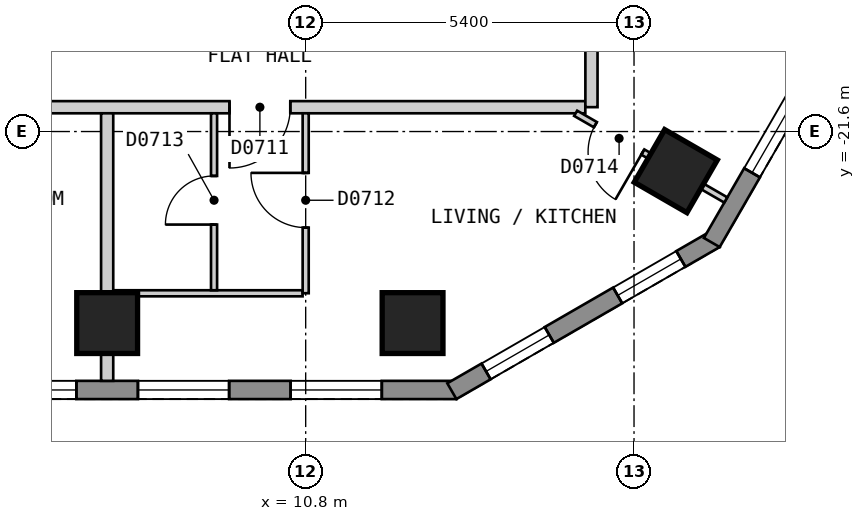
"""IFC4 building model, lengths in metres.
Left out: names, types, materials, properties, quantities, classifications, styles, units other than length and angle.
Written with IfcOpenShell. Run it as: python <this file> out.ifc"""

import sys

from ifc_helpers import new_model, si_unit, direction, frame, frame_2d, origin, origin_2d, place, context, subcontext, project, spatial, polyline, rectangle, outline, extrude, element, fill, save


model = new_model("IFC4")
c1 = context("Model", 3, precision=1e-05, world=origin(), true_north=direction((0.0, 1.0)))
c2 = subcontext(c1, "Body", "Model", "MODEL_VIEW")
j1 = project(units=[si_unit("LENGTHUNIT", "METRE"), si_unit("PLANEANGLEUNIT", "RADIAN")], contexts=[c1])
p1 = place(None, origin())
s1 = spatial("IfcSite", under=j1, at=p1, CompositionType="ELEMENT")
p2 = place(p1, origin())
s2 = spatial("IfcBuilding", under=s1, at=p2, CompositionType="ELEMENT")
p3 = place(p2, frame((0.0, 0.0, 105.0)))
s3 = spatial("IfcBuildingStorey", under=s2, at=p3, CompositionType="ELEMENT", Elevation=105.0)
for number, where, z_axis, x_axis in (
    (1, (7.535, -24.75, 0.0), (0.0, 0.0, 1.0), (1.0, 0.0, 0.0)),
    (2, (12.558, -24.75, 0.0), (0.0, 0.0, 1.0), (1.0, 0.0, 0.0)),
    (3, (16.887, -22.251, 0.0), (0.0, 0.0, 1.0), (0.5, 0.866, 0.0)),
):
    element("IfcColumn", number, at=place(p3, frame(where, z_axis=z_axis, x_axis=x_axis)), inside=s3, PredefinedType="COLUMN", context=c2, shape_type="SweptSolid", body=[
        extrude(rectangle(XDim=1.0, YDim=1.0, at=origin_2d()), origin(), (0.0, 0.0, 1.0), 3.0),
    ])
p4 = place(p3, frame((-13.279, -25.85, 0.0), z_axis=(0.0, 0.0, 1.0), x_axis=(1.0, 0.0, 0.0)))
e4 = element("IfcWall", 4, at=p4, inside=s3, PredefinedType="SOLIDWALL", context=c2, shape_type="SweptSolid", body=[
    extrude(outline(polyline([(0.0, -0.15), (26.558, -0.15), (26.478, 0.15), (0.08, 0.15), (0.0, -0.15)])), origin(), (0.0, 0.0, 1.0), 2.6),
])
p5 = place(p4, frame((1.228, 0.0, 0.15)))
e5 = element("IfcOpeningElement", 5, at=p5, cuts=e4, PredefinedType="OPENING", context=c2, shape_type="SweptSolid", body=[
    extrude(rectangle(XDim=1.5, YDim=2.1, at=frame_2d((0.75, 1.05))), frame((0.0, 0.16, 0.0), z_axis=(0.0, -1.0, 0.0), x_axis=(1.0, 0.0, 0.0)), (0.0, 0.0, 1.0), 0.32),
])
p6 = place(p4, frame((3.739, 0.0, 0.15)))
e6 = element("IfcOpeningElement", 6, at=p6, cuts=e4, PredefinedType="OPENING", context=c2, shape_type="SweptSolid", body=[
    extrude(rectangle(XDim=1.5, YDim=2.1, at=frame_2d((0.75, 1.05))), frame((0.0, 0.16, 0.0), z_axis=(0.0, -1.0, 0.0), x_axis=(1.0, 0.0, 0.0)), (0.0, 0.0, 1.0), 0.32),
])
p7 = place(p4, frame((6.251, 0.0, 0.15)))
e7 = element("IfcOpeningElement", 7, at=p7, cuts=e4, PredefinedType="OPENING", context=c2, shape_type="SweptSolid", body=[
    extrude(rectangle(XDim=1.5, YDim=2.1, at=frame_2d((0.75, 1.05))), frame((0.0, 0.16, 0.0), z_axis=(0.0, -1.0, 0.0), x_axis=(1.0, 0.0, 0.0)), (0.0, 0.0, 1.0), 0.32),
])
p8 = place(p4, frame((8.762, 0.0, 0.15)))
e8 = element("IfcOpeningElement", 8, at=p8, cuts=e4, PredefinedType="OPENING", context=c2, shape_type="SweptSolid", body=[
    extrude(rectangle(XDim=1.5, YDim=2.1, at=frame_2d((0.75, 1.05))), frame((0.0, 0.16, 0.0), z_axis=(0.0, -1.0, 0.0), x_axis=(1.0, 0.0, 0.0)), (0.0, 0.0, 1.0), 0.32),
])
p9 = place(p4, frame((11.274, 0.0, 0.15)))
e9 = element("IfcOpeningElement", 9, at=p9, cuts=e4, PredefinedType="OPENING", context=c2, shape_type="SweptSolid", body=[
    extrude(rectangle(XDim=1.5, YDim=2.1, at=frame_2d((0.75, 1.05))), frame((0.0, 0.16, 0.0), z_axis=(0.0, -1.0, 0.0), x_axis=(1.0, 0.0, 0.0)), (0.0, 0.0, 1.0), 0.32),
])
p10 = place(p4, frame((13.785, 0.0, 0.15)))
e10 = element("IfcOpeningElement", 10, at=p10, cuts=e4, PredefinedType="OPENING", context=c2, shape_type="SweptSolid", body=[
    extrude(rectangle(XDim=1.5, YDim=2.1, at=frame_2d((0.75, 1.05))), frame((0.0, 0.16, 0.0), z_axis=(0.0, -1.0, 0.0), x_axis=(1.0, 0.0, 0.0)), (0.0, 0.0, 1.0), 0.32),
])
p11 = place(p4, frame((16.297, 0.0, 0.15)))
e11 = element("IfcOpeningElement", 11, at=p11, cuts=e4, PredefinedType="OPENING", context=c2, shape_type="SweptSolid", body=[
    extrude(rectangle(XDim=1.5, YDim=2.1, at=frame_2d((0.75, 1.05))), frame((0.0, 0.16, 0.0), z_axis=(0.0, -1.0, 0.0), x_axis=(1.0, 0.0, 0.0)), (0.0, 0.0, 1.0), 0.32),
])
p12 = place(p4, frame((18.808, 0.0, 0.15)))
e12 = element("IfcOpeningElement", 12, at=p12, cuts=e4, PredefinedType="OPENING", context=c2, shape_type="SweptSolid", body=[
    extrude(rectangle(XDim=1.5, YDim=2.1, at=frame_2d((0.75, 1.05))), frame((0.0, 0.16, 0.0), z_axis=(0.0, -1.0, 0.0), x_axis=(1.0, 0.0, 0.0)), (0.0, 0.0, 1.0), 0.32),
])
p13 = place(p4, frame((21.32, 0.0, 0.15)))
e13 = element("IfcOpeningElement", 13, at=p13, cuts=e4, PredefinedType="OPENING", context=c2, shape_type="SweptSolid", body=[
    extrude(rectangle(XDim=1.5, YDim=2.1, at=frame_2d((0.75, 1.05))), frame((0.0, 0.16, 0.0), z_axis=(0.0, -1.0, 0.0), x_axis=(1.0, 0.0, 0.0)), (0.0, 0.0, 1.0), 0.32),
])
p14 = place(p4, frame((23.831, 0.0, 0.15)))
e14 = element("IfcOpeningElement", 14, at=p14, cuts=e4, PredefinedType="OPENING", context=c2, shape_type="SweptSolid", body=[
    extrude(rectangle(XDim=1.5, YDim=2.1, at=frame_2d((0.75, 1.05))), frame((0.0, 0.16, 0.0), z_axis=(0.0, -1.0, 0.0), x_axis=(1.0, 0.0, 0.0)), (0.0, 0.0, 1.0), 0.32),
])
p15 = place(p3, frame((13.204, -25.87, 0.0), z_axis=(0.0, 0.0, 1.0), x_axis=(0.866010750942, 0.50002537861, 0.0)))
e15 = element("IfcWall", 15, at=p15, inside=s3, PredefinedType="SOLIDWALL", context=c2, shape_type="SweptSolid", body=[
    extrude(outline(polyline([(0.0, -0.15), (5.0, -0.15), (4.919, 0.15), (0.08, 0.15), (0.0, -0.15)])), origin(), (0.0, 0.0, 1.0), 2.6),
])
p16 = place(p15, frame((0.65, 0.0, 0.15)))
e16 = element("IfcOpeningElement", 16, at=p16, cuts=e15, PredefinedType="OPENING", context=c2, shape_type="SweptSolid", body=[
    extrude(rectangle(XDim=1.2, YDim=2.1, at=frame_2d((0.6, 1.05))), frame((0.0, 0.16, 0.0), z_axis=(0.0, -1.0, 0.0), x_axis=(1.0, 0.0, 0.0)), (0.0, 0.0, 1.0), 0.32),
])
p17 = place(p15, frame((3.149, 0.0, 0.15)))
e17 = element("IfcOpeningElement", 17, at=p17, cuts=e15, PredefinedType="OPENING", context=c2, shape_type="SweptSolid", body=[
    extrude(rectangle(XDim=1.2, YDim=2.1, at=frame_2d((0.6, 1.05))), frame((0.0, 0.16, 0.0), z_axis=(0.0, -1.0, 0.0), x_axis=(1.0, 0.0, 0.0)), (0.0, 0.0, 1.0), 0.32),
])
p18 = place(p3, frame((17.479, -23.425, 0.0), z_axis=(0.0, 0.0, 1.0), x_axis=(0.500035407905, 0.866004960056, 0.0)))
e18 = element("IfcWall", 18, at=p18, inside=s3, PredefinedType="SOLIDWALL", context=c2, shape_type="SweptSolid", body=[
    extrude(outline(polyline([(0.0, -0.15), (23.094, -0.15), (23.014, 0.15), (0.08, 0.15), (0.0, -0.15)])), origin(), (0.0, 0.0, 1.0), 2.6),
])
p19 = place(p18, frame((1.324, 0.0, 0.15)))
e19 = element("IfcOpeningElement", 19, at=p19, cuts=e18, PredefinedType="OPENING", context=c2, shape_type="SweptSolid", body=[
    extrude(rectangle(XDim=1.5, YDim=2.1, at=frame_2d((0.75, 1.05))), frame((0.0, 0.16, 0.0), z_axis=(0.0, -1.0, 0.0), x_axis=(1.0, 0.0, 0.0)), (0.0, 0.0, 1.0), 0.32),
])
p20 = place(p18, frame((4.031, 0.0, 0.15)))
e20 = element("IfcOpeningElement", 20, at=p20, cuts=e18, PredefinedType="OPENING", context=c2, shape_type="SweptSolid", body=[
    extrude(rectangle(XDim=1.5, YDim=2.1, at=frame_2d((0.75, 1.05))), frame((0.0, 0.16, 0.0), z_axis=(0.0, -1.0, 0.0), x_axis=(1.0, 0.0, 0.0)), (0.0, 0.0, 1.0), 0.32),
])
p21 = place(p18, frame((6.737, 0.0, 0.15)))
e21 = element("IfcOpeningElement", 21, at=p21, cuts=e18, PredefinedType="OPENING", context=c2, shape_type="SweptSolid", body=[
    extrude(rectangle(XDim=1.5, YDim=2.1, at=frame_2d((0.75, 1.05))), frame((0.0, 0.16, 0.0), z_axis=(0.0, -1.0, 0.0), x_axis=(1.0, 0.0, 0.0)), (0.0, 0.0, 1.0), 0.32),
])
p22 = place(p18, frame((9.444, 0.0, 0.15)))
e22 = element("IfcOpeningElement", 22, at=p22, cuts=e18, PredefinedType="OPENING", context=c2, shape_type="SweptSolid", body=[
    extrude(rectangle(XDim=1.5, YDim=2.1, at=frame_2d((0.75, 1.05))), frame((0.0, 0.16, 0.0), z_axis=(0.0, -1.0, 0.0), x_axis=(1.0, 0.0, 0.0)), (0.0, 0.0, 1.0), 0.32),
])
p23 = place(p18, frame((12.151, 0.0, 0.15)))
e23 = element("IfcOpeningElement", 23, at=p23, cuts=e18, PredefinedType="OPENING", context=c2, shape_type="SweptSolid", body=[
    extrude(rectangle(XDim=1.5, YDim=2.1, at=frame_2d((0.75, 1.05))), frame((0.0, 0.16, 0.0), z_axis=(0.0, -1.0, 0.0), x_axis=(1.0, 0.0, 0.0)), (0.0, 0.0, 1.0), 0.32),
])
p24 = place(p18, frame((14.857, 0.0, 0.15)))
e24 = element("IfcOpeningElement", 24, at=p24, cuts=e18, PredefinedType="OPENING", context=c2, shape_type="SweptSolid", body=[
    extrude(rectangle(XDim=1.5, YDim=2.1, at=frame_2d((0.75, 1.05))), frame((0.0, 0.16, 0.0), z_axis=(0.0, -1.0, 0.0), x_axis=(1.0, 0.0, 0.0)), (0.0, 0.0, 1.0), 0.32),
])
p25 = place(p18, frame((17.564, 0.0, 0.15)))
e25 = element("IfcOpeningElement", 25, at=p25, cuts=e18, PredefinedType="OPENING", context=c2, shape_type="SweptSolid", body=[
    extrude(rectangle(XDim=1.5, YDim=2.1, at=frame_2d((0.75, 1.05))), frame((0.0, 0.16, 0.0), z_axis=(0.0, -1.0, 0.0), x_axis=(1.0, 0.0, 0.0)), (0.0, 0.0, 1.0), 0.32),
])
p26 = place(p18, frame((20.271, 0.0, 0.15)))
e26 = element("IfcOpeningElement", 26, at=p26, cuts=e18, PredefinedType="OPENING", context=c2, shape_type="SweptSolid", body=[
    extrude(rectangle(XDim=1.5, YDim=2.1, at=frame_2d((0.75, 1.05))), frame((0.0, 0.16, 0.0), z_axis=(0.0, -1.0, 0.0), x_axis=(1.0, 0.0, 0.0)), (0.0, 0.0, 1.0), 0.32),
])
p27 = place(p3, frame((-15.499, -21.2, 0.0), z_axis=(0.0, 0.0, 1.0), x_axis=(1.0, 0.0, 0.0)))
e27 = element("IfcWall", 27, at=p27, inside=s3, PredefinedType="PARTITIONING", context=c2, shape_type="SweptSolid", body=[
    extrude(rectangle(XDim=30.898, YDim=0.2, at=frame_2d((15.449, 0.0))), origin(), (0.0, 0.0, 1.0), 2.6),
])
p28 = place(p27, frame((9.977, 0.0, 0.0)))
e28 = element("IfcOpeningElement", 28, at=p28, cuts=e27, PredefinedType="OPENING", context=c2, shape_type="SweptSolid", body=[
    extrude(rectangle(XDim=1.0, YDim=2.1, at=frame_2d((0.5, 1.05))), frame((0.0, 0.11, 0.0), z_axis=(0.0, -1.0, 0.0), x_axis=(1.0, 0.0, 0.0)), (0.0, 0.0, 1.0), 0.22),
])
p29 = place(p27, frame((25.046, 0.0, 0.0)))
e29 = element("IfcOpeningElement", 29, at=p29, cuts=e27, PredefinedType="OPENING", context=c2, shape_type="SweptSolid", body=[
    extrude(rectangle(XDim=1.0, YDim=2.1, at=frame_2d((0.5, 1.05))), frame((0.0, 0.11, 0.0), z_axis=(0.0, -1.0, 0.0), x_axis=(1.0, 0.0, 0.0)), (0.0, 0.0, 1.0), 0.22),
])
p30 = place(p3, frame((15.5, -21.199, 0.0), z_axis=(0.0, 0.0, 1.0), x_axis=(0.0, 1.0, 0.0)))
e30 = element("IfcWall", 30, at=p30, inside=s3, PredefinedType="PARTITIONING", context=c2, shape_type="SweptSolid", body=[
    extrude(rectangle(XDim=10.483, YDim=0.2, at=frame_2d((5.241, 0.0))), origin(), (0.0, 0.0, 1.0), 2.6),
])
p31 = place(p3, frame((15.24, -21.3, 0.0), z_axis=(0.0, 0.0, 1.0), x_axis=(0.866090043625, -0.499888023795, 0.0)))
e31 = element("IfcWall", 31, at=p31, inside=s3, PredefinedType="PARTITIONING", context=c2, shape_type="SweptSolid", body=[
    extrude(rectangle(XDim=2.851, YDim=0.1, at=frame_2d((1.425, 0.0))), origin(), (0.0, 0.0, 1.0), 2.6),
])
p32 = place(p31, frame((0.375, 0.0, 0.0)))
e32 = element("IfcOpeningElement", 32, at=p32, cuts=e31, PredefinedType="OPENING", context=c2, shape_type="SweptSolid", body=[
    extrude(rectangle(XDim=0.9, YDim=2.1, at=frame_2d((0.45, 1.05))), frame((0.0, 0.06, 0.0), z_axis=(0.0, -1.0, 0.0), x_axis=(1.0, 0.0, 0.0)), (0.0, 0.0, 1.0), 0.12),
])
p33 = place(p3, frame((7.635, -24.26, 0.0), z_axis=(0.0, 0.0, 1.0), x_axis=(1.0, 0.0, 0.0)))
e33 = element("IfcWall", 33, at=p33, inside=s3, PredefinedType="PARTITIONING", context=c2, shape_type="SweptSolid", body=[
    extrude(rectangle(XDim=3.114, YDim=0.1, at=frame_2d((1.557, 0.0))), origin(), (0.0, 0.0, 1.0), 2.6),
])
p34 = place(p3, frame((9.293, -24.21, 0.0), z_axis=(0.0, 0.0, 1.0), x_axis=(0.0, 1.0, 0.0)))
e34 = element("IfcWall", 34, at=p34, inside=s3, PredefinedType="PARTITIONING", context=c2, shape_type="SweptSolid", body=[
    extrude(rectangle(XDim=2.91, YDim=0.1, at=frame_2d((1.455, 0.0))), origin(), (0.0, 0.0, 1.0), 2.6),
])
p35 = place(p34, frame((1.08, 0.0, 0.0)))
e35 = element("IfcOpeningElement", 35, at=p35, cuts=e34, PredefinedType="OPENING", context=c2, shape_type="SweptSolid", body=[
    extrude(rectangle(XDim=0.8, YDim=2.1, at=frame_2d((0.4, 1.05))), frame((0.0, 0.06, 0.0), z_axis=(0.0, -1.0, 0.0), x_axis=(1.0, 0.0, 0.0)), (0.0, 0.0, 1.0), 0.12),
])
p36 = place(p3, frame((10.8, -24.259, 0.0), z_axis=(0.0, 0.0, 1.0), x_axis=(0.0, 1.0, 0.0)))
e36 = element("IfcWall", 36, at=p36, inside=s3, PredefinedType="PARTITIONING", context=c2, shape_type="SweptSolid", body=[
    extrude(rectangle(XDim=2.959, YDim=0.1, at=frame_2d((1.479, 0.0))), origin(), (0.0, 0.0, 1.0), 2.6),
])
p37 = place(p36, frame((1.079, 0.0, 0.0)))
e37 = element("IfcOpeningElement", 37, at=p37, cuts=e36, PredefinedType="OPENING", context=c2, shape_type="SweptSolid", body=[
    extrude(rectangle(XDim=0.9, YDim=2.1, at=frame_2d((0.45, 1.05))), frame((0.0, 0.06, 0.0), z_axis=(0.0, -1.0, 0.0), x_axis=(1.0, 0.0, 0.0)), (0.0, 0.0, 1.0), 0.12),
])
p38 = place(p3, frame((7.535, -21.3, 0.0), z_axis=(0.0, 0.0, 1.0), x_axis=(0.0, -1.0, 0.0)))
e38 = element("IfcWall", 38, at=p38, inside=s3, PredefinedType="PARTITIONING", context=c2, shape_type="SweptSolid", body=[
    extrude(rectangle(XDim=2.98, YDim=0.2, at=frame_2d((1.49, 0.0))), origin(), (0.0, 0.0, 1.0), 2.6),
])
p39 = place(p3, frame((7.535, -25.7, 0.0), z_axis=(0.0, 0.0, 1.0), x_axis=(0.0, 1.0, 0.0)))
e39 = element("IfcWall", 39, at=p39, inside=s3, PredefinedType="PARTITIONING", context=c2, shape_type="SweptSolid", body=[
    extrude(rectangle(XDim=1.46, YDim=0.2, at=frame_2d((0.73, 0.0))), origin(), (0.0, 0.0, 1.0), 2.6),
])
p40 = place(p12, origin())
e40 = element("IfcWindow", 40, at=p40, inside=s3, PartitioningType="SINGLE_PANEL", PredefinedType="WINDOW", context=c2, shape_type="SweptSolid", body=[
    extrude(rectangle(XDim=1.5, YDim=2.1, at=frame_2d((0.75, 1.05))), frame((0.0, 0.03, 0.0), z_axis=(0.0, -1.0, 0.0), x_axis=(1.0, 0.0, 0.0)), (0.0, 0.0, 1.0), 0.06),
])
fill(e12, e40)
p41 = place(p13, origin())
e41 = element("IfcWindow", 41, at=p41, inside=s3, PartitioningType="SINGLE_PANEL", PredefinedType="WINDOW", context=c2, shape_type="SweptSolid", body=[
    extrude(rectangle(XDim=1.5, YDim=2.1, at=frame_2d((0.75, 1.05))), frame((0.0, 0.03, 0.0), z_axis=(0.0, -1.0, 0.0), x_axis=(1.0, 0.0, 0.0)), (0.0, 0.0, 1.0), 0.06),
])
fill(e13, e41)
p42 = place(p14, origin())
e42 = element("IfcWindow", 42, at=p42, inside=s3, PartitioningType="SINGLE_PANEL", PredefinedType="WINDOW", context=c2, shape_type="SweptSolid", body=[
    extrude(rectangle(XDim=1.5, YDim=2.1, at=frame_2d((0.75, 1.05))), frame((0.0, 0.03, 0.0), z_axis=(0.0, -1.0, 0.0), x_axis=(1.0, 0.0, 0.0)), (0.0, 0.0, 1.0), 0.06),
])
fill(e14, e42)
p43 = place(p16, origin())
e43 = element("IfcWindow", 43, at=p43, inside=s3, PartitioningType="SINGLE_PANEL", PredefinedType="WINDOW", context=c2, shape_type="SweptSolid", body=[
    extrude(rectangle(XDim=1.2, YDim=2.1, at=frame_2d((0.6, 1.05))), frame((0.0, 0.03, 0.0), z_axis=(0.0, -1.0, 0.0), x_axis=(1.0, 0.0, 0.0)), (0.0, 0.0, 1.0), 0.06),
])
fill(e16, e43)
p44 = place(p17, origin())
e44 = element("IfcWindow", 44, at=p44, inside=s3, PartitioningType="SINGLE_PANEL", PredefinedType="WINDOW", context=c2, shape_type="SweptSolid", body=[
    extrude(rectangle(XDim=1.2, YDim=2.1, at=frame_2d((0.6, 1.05))), frame((0.0, 0.03, 0.0), z_axis=(0.0, -1.0, 0.0), x_axis=(1.0, 0.0, 0.0)), (0.0, 0.0, 1.0), 0.06),
])
fill(e17, e44)
p45 = place(p19, origin())
e45 = element("IfcWindow", 45, at=p45, inside=s3, PartitioningType="SINGLE_PANEL", PredefinedType="WINDOW", context=c2, shape_type="SweptSolid", body=[
    extrude(rectangle(XDim=1.5, YDim=2.1, at=frame_2d((0.75, 1.05))), frame((0.0, 0.03, 0.0), z_axis=(0.0, -1.0, 0.0), x_axis=(1.0, 0.0, 0.0)), (0.0, 0.0, 1.0), 0.06),
])
fill(e19, e45)
p46 = place(p29, origin())
e46 = element("IfcDoor", 46, at=p46, inside=s3, OperationType="SINGLE_SWING_LEFT", PredefinedType="DOOR", context=c2, shape_type="SweptSolid", body=[
    extrude(rectangle(XDim=1.0, YDim=2.1, at=frame_2d((0.5, 1.05))), frame((0.0, 0.025, 0.0), z_axis=(0.0, -1.0, 0.0), x_axis=(1.0, 0.0, 0.0)), (0.0, 0.0, 1.0), 0.05),
])
fill(e29, e46)
p47 = place(p37, origin())
e47 = element("IfcDoor", 47, at=p47, inside=s3, OperationType="SINGLE_SWING_RIGHT", PredefinedType="DOOR", context=c2, shape_type="SweptSolid", body=[
    extrude(rectangle(XDim=0.9, YDim=2.1, at=frame_2d((0.45, 1.05))), frame((0.0, 0.025, 0.0), z_axis=(0.0, -1.0, 0.0), x_axis=(1.0, 0.0, 0.0)), (0.0, 0.0, 1.0), 0.05),
])
fill(e37, e47)
p48 = place(p35, origin())
e48 = element("IfcDoor", 48, at=p48, inside=s3, OperationType="SINGLE_SWING_LEFT", PredefinedType="DOOR", context=c2, shape_type="SweptSolid", body=[
    extrude(rectangle(XDim=0.8, YDim=2.1, at=frame_2d((0.4, 1.05))), frame((0.0, 0.025, 0.0), z_axis=(0.0, -1.0, 0.0), x_axis=(1.0, 0.0, 0.0)), (0.0, 0.0, 1.0), 0.05),
])
fill(e35, e48)
p49 = place(p32, origin())
e49 = element("IfcDoor", 49, at=p49, inside=s3, OperationType="SINGLE_SWING_RIGHT", PredefinedType="DOOR", context=c2, shape_type="SweptSolid", body=[
    extrude(rectangle(XDim=0.9, YDim=2.1, at=frame_2d((0.45, 1.05))), frame((0.0, 0.025, 0.0), z_axis=(0.0, -1.0, 0.0), x_axis=(1.0, 0.0, 0.0)), (0.0, 0.0, 1.0), 0.05),
])
fill(e32, e49)
save(model, sys.argv[1])
